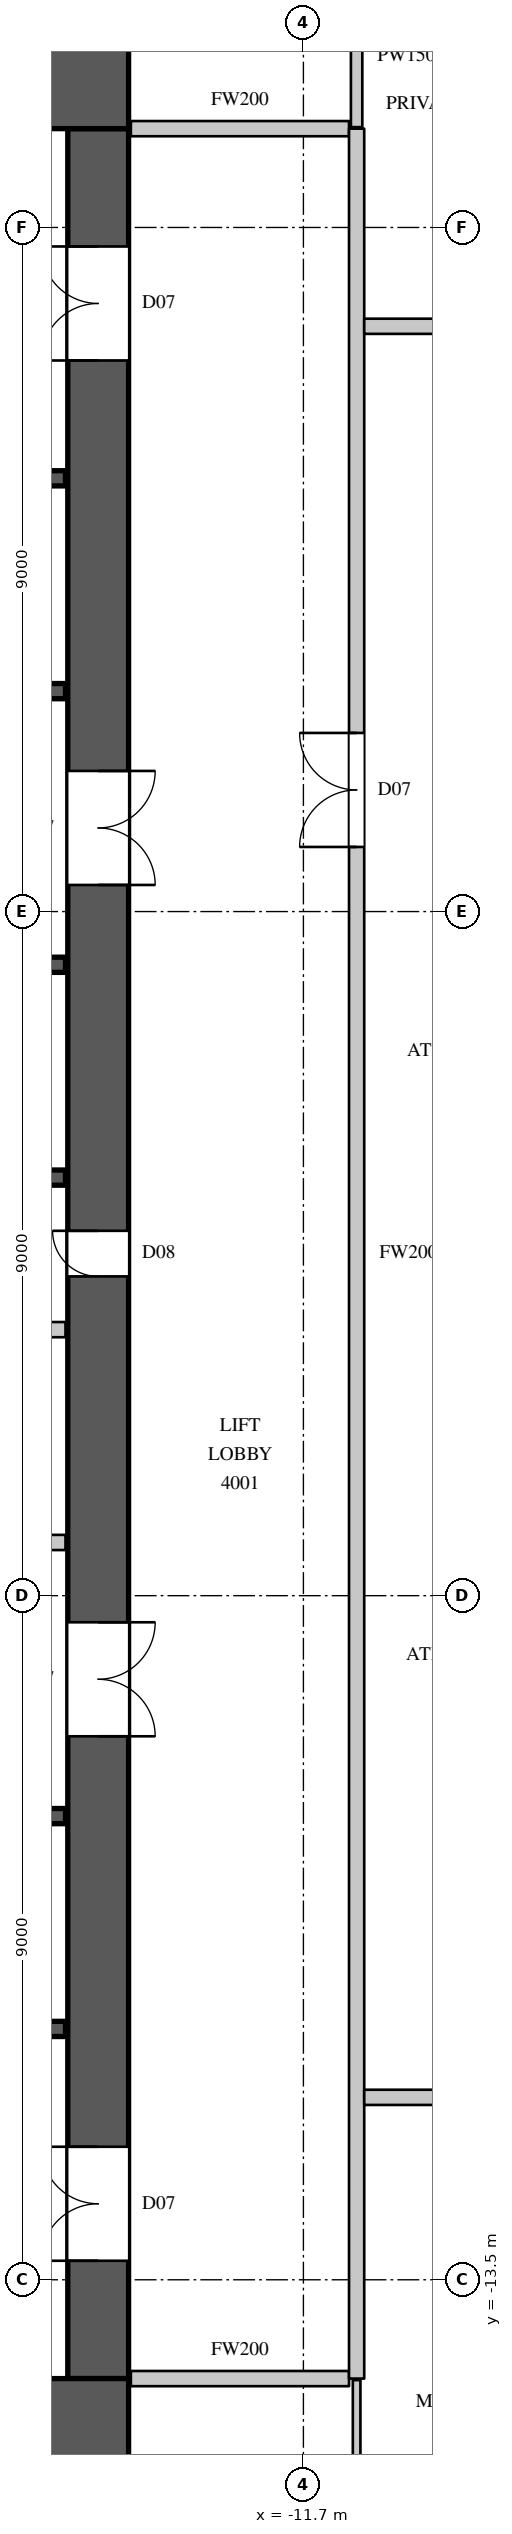
"""IFC4 building model, lengths in metres.
Left out: names, types, materials, properties, quantities, classifications, styles, units other than length and angle.
Written with IfcOpenShell. Run it as: python <this file> out.ifc"""

import sys

from ifc_helpers import new_model, si_unit, direction, frame, frame_2d, origin, place, context, subcontext, project, spatial, rectangle, extrude, element, fill, save


model = new_model("IFC4")
c1 = context("Model", 3, precision=1e-05, world=origin(), true_north=direction((0.0, 1.0)))
c2 = subcontext(c1, "Body", "Model", "MODEL_VIEW")
j1 = project(units=[si_unit("LENGTHUNIT", "METRE"), si_unit("PLANEANGLEUNIT", "RADIAN")], contexts=[c1])
p1 = place(None, origin())
s1 = spatial("IfcSite", under=j1, at=p1, CompositionType="ELEMENT")
p2 = place(p1, origin())
s2 = spatial("IfcBuilding", under=s1, at=p2, CompositionType="ELEMENT")
p3 = place(p2, frame((0.0, 0.0, 185.1)))
s3 = spatial("IfcBuildingStorey", under=s2, at=p3, CompositionType="ELEMENT", Elevation=185.1)
for number, where, z_axis, x_axis in (
    (1, (-30.0, 15.4, 0.0), (0.0, 0.0, 1.0), (1.0, 0.0, 0.0)),
    (2, (-30.0, -15.4, 0.0), (0.0, 0.0, 1.0), (1.0, 0.0, 0.0)),
):
    element("IfcWall", number, at=place(p3, frame(where, z_axis=z_axis, x_axis=x_axis)), inside=s3, PredefinedType="SHEAR", context=c2, shape_type="SweptSolid", body=[
        extrude(rectangle(XDim=16.0, YDim=1.2, at=frame_2d((8.0, 0.0))), origin(), (0.0, 0.0, 1.0), 4.1),
    ])
p4 = place(p3, frame((-14.4, -14.8, 0.0), z_axis=(0.0, 0.0, 1.0), x_axis=(0.0, 1.0, 0.0)))
e3 = element("IfcWall", 3, at=p4, inside=s3, PredefinedType="SHEAR", context=c2, shape_type="SweptSolid", body=[
    extrude(rectangle(XDim=29.6, YDim=0.8, at=frame_2d((14.8, 0.0))), origin(), (0.0, 0.0, 1.0), 4.1),
])
p5 = place(p4, frame((1.55, 0.0, 0.0)))
e4 = element("IfcOpeningElement", 4, at=p5, cuts=e3, PredefinedType="OPENING", context=c2, shape_type="SweptSolid", body=[
    extrude(rectangle(XDim=1.5, YDim=2.4, at=frame_2d((0.75, 1.2))), frame((0.0, 0.41, 0.0), z_axis=(0.0, -1.0, 0.0), x_axis=(1.0, 0.0, 0.0)), (0.0, 0.0, 1.0), 0.82),
])
p6 = place(p4, frame((26.55, 0.0, 0.0)))
e5 = element("IfcOpeningElement", 5, at=p6, cuts=e3, PredefinedType="OPENING", context=c2, shape_type="SweptSolid", body=[
    extrude(rectangle(XDim=1.5, YDim=2.4, at=frame_2d((0.75, 1.2))), frame((0.0, 0.41, 0.0), z_axis=(0.0, -1.0, 0.0), x_axis=(1.0, 0.0, 0.0)), (0.0, 0.0, 1.0), 0.82),
])
p7 = place(p4, frame((8.45, 0.0, 0.0)))
e6 = element("IfcOpeningElement", 6, at=p7, cuts=e3, PredefinedType="OPENING", context=c2, shape_type="SweptSolid", body=[
    extrude(rectangle(XDim=1.5, YDim=2.4, at=frame_2d((0.75, 1.2))), frame((0.0, 0.41, 0.0), z_axis=(0.0, -1.0, 0.0), x_axis=(1.0, 0.0, 0.0)), (0.0, 0.0, 1.0), 0.82),
])
p8 = place(p4, frame((19.65, 0.0, 0.0)))
e7 = element("IfcOpeningElement", 7, at=p8, cuts=e3, PredefinedType="OPENING", context=c2, shape_type="SweptSolid", body=[
    extrude(rectangle(XDim=1.5, YDim=2.4, at=frame_2d((0.75, 1.2))), frame((0.0, 0.41, 0.0), z_axis=(0.0, -1.0, 0.0), x_axis=(1.0, 0.0, 0.0)), (0.0, 0.0, 1.0), 0.82),
])
p9 = place(p4, frame((14.5, 0.0, 0.0)))
e8 = element("IfcOpeningElement", 8, at=p9, cuts=e3, PredefinedType="OPENING", context=c2, shape_type="SweptSolid", body=[
    extrude(rectangle(XDim=0.6, YDim=2.0, at=frame_2d((0.3, 1.0))), frame((0.0, 0.41, 0.0), z_axis=(0.0, -1.0, 0.0), x_axis=(1.0, 0.0, 0.0)), (0.0, 0.0, 1.0), 0.82),
])
p10 = place(p3, frame((-23.02, -3.8, 0.0), z_axis=(0.0, 0.0, 1.0), x_axis=(1.0, 0.0, 0.0)))
e9 = element("IfcWall", 9, at=p10, inside=s3, PredefinedType="PARTITIONING", context=c2, shape_type="SweptSolid", body=[
    extrude(rectangle(XDim=8.19, YDim=0.2, at=frame_2d((4.095, 0.0))), origin(), (0.0, 0.0, 1.0), 3.8),
])
p11 = place(p10, frame((1.5, 0.0, 0.0)))
e10 = element("IfcOpeningElement", 10, at=p11, cuts=e9, PredefinedType="OPENING", context=c2, shape_type="SweptSolid", body=[
    extrude(rectangle(XDim=0.9, YDim=2.2, at=frame_2d((0.45, 1.1))), frame((0.0, 0.11, 0.0), z_axis=(0.0, -1.0, 0.0), x_axis=(1.0, 0.0, 0.0)), (0.0, 0.0, 1.0), 0.22),
])
p12 = place(p10, frame((5.45, 0.0, 0.0)))
e11 = element("IfcOpeningElement", 11, at=p12, cuts=e9, PredefinedType="OPENING", context=c2, shape_type="SweptSolid", body=[
    extrude(rectangle(XDim=0.9, YDim=2.2, at=frame_2d((0.45, 1.1))), frame((0.0, 0.11, 0.0), z_axis=(0.0, -1.0, 0.0), x_axis=(1.0, 0.0, 0.0)), (0.0, 0.0, 1.0), 0.22),
])
for number, where, z_axis, x_axis in (
    (12, (-13.97, -14.8, 0.0), (0.0, 0.0, 1.0), (1.0, 0.0, 0.0)),
    (13, (-13.97, 14.8, 0.0), (0.0, 0.0, 1.0), (1.0, 0.0, 0.0)),
):
    element("IfcWall", number, at=place(p3, frame(where, z_axis=z_axis, x_axis=x_axis)), inside=s3, PredefinedType="PARTITIONING", context=c2, shape_type="SweptSolid", body=[
        extrude(rectangle(XDim=2.87, YDim=0.2, at=frame_2d((1.435, 0.0))), origin(), (0.0, 0.0, 1.0), 3.8),
    ])
p13 = place(p3, frame((-11.0, -14.8, 0.0), z_axis=(0.0, 0.0, 1.0), x_axis=(0.0, 1.0, 0.0)))
e14 = element("IfcWall", 14, at=p13, inside=s3, PredefinedType="PARTITIONING", context=c2, shape_type="SweptSolid", body=[
    extrude(rectangle(XDim=29.6, YDim=0.2, at=frame_2d((14.8, 0.0))), origin(), (0.0, 0.0, 1.0), 3.8),
])
p14 = place(p13, frame((20.15, 0.0, 0.0)))
e15 = element("IfcOpeningElement", 15, at=p14, cuts=e14, PredefinedType="OPENING", context=c2, shape_type="SweptSolid", body=[
    extrude(rectangle(XDim=1.5, YDim=2.4, at=frame_2d((0.75, 1.2))), frame((0.0, 0.11, 0.0), z_axis=(0.0, -1.0, 0.0), x_axis=(1.0, 0.0, 0.0)), (0.0, 0.0, 1.0), 0.22),
])
p15 = place(p3, frame((-10.9, -11.1, 0.0), z_axis=(0.0, 0.0, 1.0), x_axis=(1.0, 0.0, 0.0)))
e16 = element("IfcWall", 16, at=p15, inside=s3, PredefinedType="PARTITIONING", context=c2, shape_type="SweptSolid", body=[
    extrude(rectangle(XDim=20.9, YDim=0.2, at=frame_2d((10.45, 0.0))), origin(), (0.0, 0.0, 1.0), 3.8),
])
p16 = place(p15, frame((1.1, 0.0, 0.0)))
e17 = element("IfcOpeningElement", 17, at=p16, cuts=e16, PredefinedType="OPENING", context=c2, shape_type="SweptSolid", body=[
    extrude(rectangle(XDim=0.9, YDim=2.2, at=frame_2d((0.45, 1.1))), frame((0.0, 0.11, 0.0), z_axis=(0.0, -1.0, 0.0), x_axis=(1.0, 0.0, 0.0)), (0.0, 0.0, 1.0), 0.22),
])
p17 = place(p15, frame((4.9, 0.0, 0.0)))
e18 = element("IfcOpeningElement", 18, at=p17, cuts=e16, PredefinedType="OPENING", context=c2, shape_type="SweptSolid", body=[
    extrude(rectangle(XDim=0.9, YDim=2.2, at=frame_2d((0.45, 1.1))), frame((0.0, 0.11, 0.0), z_axis=(0.0, -1.0, 0.0), x_axis=(1.0, 0.0, 0.0)), (0.0, 0.0, 1.0), 0.22),
])
p18 = place(p15, frame((7.25, 0.0, 0.0)))
e19 = element("IfcOpeningElement", 19, at=p18, cuts=e16, PredefinedType="OPENING", context=c2, shape_type="SweptSolid", body=[
    extrude(rectangle(XDim=0.9, YDim=2.2, at=frame_2d((0.45, 1.1))), frame((0.0, 0.11, 0.0), z_axis=(0.0, -1.0, 0.0), x_axis=(1.0, 0.0, 0.0)), (0.0, 0.0, 1.0), 0.22),
])
p19 = place(p15, frame((9.95, 0.0, 0.0)))
e20 = element("IfcOpeningElement", 20, at=p19, cuts=e16, PredefinedType="OPENING", context=c2, shape_type="SweptSolid", body=[
    extrude(rectangle(XDim=1.1, YDim=2.4, at=frame_2d((0.55, 1.2))), frame((0.0, 0.11, 0.0), z_axis=(0.0, -1.0, 0.0), x_axis=(1.0, 0.0, 0.0)), (0.0, 0.0, 1.0), 0.22),
])
p20 = place(p15, frame((16.3, 0.0, 0.0)))
e21 = element("IfcOpeningElement", 21, at=p20, cuts=e16, PredefinedType="OPENING", context=c2, shape_type="SweptSolid", body=[
    extrude(rectangle(XDim=1.1, YDim=2.4, at=frame_2d((0.55, 1.2))), frame((0.0, 0.11, 0.0), z_axis=(0.0, -1.0, 0.0), x_axis=(1.0, 0.0, 0.0)), (0.0, 0.0, 1.0), 0.22),
])
p21 = place(p3, frame((-10.9, 12.2, 0.0), z_axis=(0.0, 0.0, 1.0), x_axis=(1.0, 0.0, 0.0)))
e22 = element("IfcWall", 22, at=p21, inside=s3, PredefinedType="PARTITIONING", context=c2, shape_type="SweptSolid", body=[
    extrude(rectangle(XDim=3.704, YDim=0.2, at=frame_2d((1.852, 0.0))), origin(), (0.0, 0.0, 1.0), 3.8),
])
p22 = place(p21, frame((1.7, 0.0, 0.0)))
e23 = element("IfcOpeningElement", 23, at=p22, cuts=e22, PredefinedType="OPENING", context=c2, shape_type="SweptSolid", body=[
    extrude(rectangle(XDim=1.1, YDim=2.4, at=frame_2d((0.55, 1.2))), frame((0.0, 0.11, 0.0), z_axis=(0.0, -1.0, 0.0), x_axis=(1.0, 0.0, 0.0)), (0.0, 0.0, 1.0), 0.22),
])
p23 = place(p3, frame((-11.0, 14.82, 0.0), z_axis=(0.0, 0.0, 1.0), x_axis=(0.0, 1.0, 0.0)))
e24 = element("IfcWall", 24, at=p23, inside=s3, PredefinedType="PARTITIONING", context=c2, shape_type="SweptSolid", body=[
    extrude(rectangle(XDim=1.88, YDim=0.15, at=frame_2d((0.94, 0.0))), origin(), (0.0, 0.0, 1.0), 3.8),
])
p24 = place(p3, frame((-29.17, -1.0, 0.0), z_axis=(0.0, 0.0, 1.0), x_axis=(1.0, 0.0, 0.0)))
e25 = element("IfcWall", 25, at=p24, inside=s3, PredefinedType="PARTITIONING", context=c2, shape_type="SweptSolid", body=[
    extrude(rectangle(XDim=14.34, YDim=0.2, at=frame_2d((7.17, 0.0))), origin(), (0.0, 0.0, 1.0), 3.8),
])
p25 = place(p3, frame((-26.08, 1.0, 0.0), z_axis=(0.0, 0.0, 1.0), x_axis=(1.0, 0.0, 0.0)))
e26 = element("IfcWall", 26, at=p25, inside=s3, PredefinedType="SHEAR", context=c2, shape_type="SweptSolid", body=[
    extrude(rectangle(XDim=11.25, YDim=0.2, at=frame_2d((5.625, 0.0))), origin(), (0.0, 0.0, 1.0), 3.8),
])
p26 = place(p3, frame((-26.08, 3.8, 0.0), z_axis=(0.0, 0.0, 1.0), x_axis=(1.0, 0.0, 0.0)))
e27 = element("IfcWall", 27, at=p26, inside=s3, PredefinedType="SHEAR", context=c2, shape_type="SweptSolid", body=[
    extrude(rectangle(XDim=11.25, YDim=0.2, at=frame_2d((5.625, 0.0))), origin(), (0.0, 0.0, 1.0), 3.8),
])
p27 = place(p26, frame((0.8, 0.0, 0.0)))
e28 = element("IfcOpeningElement", 28, at=p27, cuts=e27, PredefinedType="OPENING", context=c2, shape_type="SweptSolid", body=[
    extrude(rectangle(XDim=1.1, YDim=2.2, at=frame_2d((0.55, 1.1))), frame((0.0, 0.11, 0.0), z_axis=(0.0, -1.0, 0.0), x_axis=(1.0, 0.0, 0.0)), (0.0, 0.0, 1.0), 0.22),
])
p28 = place(p26, frame((3.55, 0.0, 0.0)))
e29 = element("IfcOpeningElement", 29, at=p28, cuts=e27, PredefinedType="OPENING", context=c2, shape_type="SweptSolid", body=[
    extrude(rectangle(XDim=1.1, YDim=2.2, at=frame_2d((0.55, 1.1))), frame((0.0, 0.11, 0.0), z_axis=(0.0, -1.0, 0.0), x_axis=(1.0, 0.0, 0.0)), (0.0, 0.0, 1.0), 0.22),
])
p29 = place(p26, frame((6.25, 0.0, 0.0)))
e30 = element("IfcOpeningElement", 30, at=p29, cuts=e27, PredefinedType="OPENING", context=c2, shape_type="SweptSolid", body=[
    extrude(rectangle(XDim=1.1, YDim=2.2, at=frame_2d((0.55, 1.1))), frame((0.0, 0.11, 0.0), z_axis=(0.0, -1.0, 0.0), x_axis=(1.0, 0.0, 0.0)), (0.0, 0.0, 1.0), 0.22),
])
p30 = place(p26, frame((9.15, 0.0, 0.0)))
e31 = element("IfcOpeningElement", 31, at=p30, cuts=e27, PredefinedType="OPENING", context=c2, shape_type="SweptSolid", body=[
    extrude(rectangle(XDim=1.1, YDim=2.2, at=frame_2d((0.55, 1.1))), frame((0.0, 0.11, 0.0), z_axis=(0.0, -1.0, 0.0), x_axis=(1.0, 0.0, 0.0)), (0.0, 0.0, 1.0), 0.22),
])
p31 = place(p3, frame((-17.92, -10.2, 0.0), z_axis=(0.0, 0.0, 1.0), x_axis=(1.0, 0.0, 0.0)))
e32 = element("IfcWall", 32, at=p31, inside=s3, PredefinedType="SHEAR", context=c2, shape_type="SweptSolid", body=[
    extrude(rectangle(XDim=3.09, YDim=0.2, at=frame_2d((1.545, 0.0))), origin(), (0.0, 0.0, 1.0), 3.8),
])
p32 = place(p31, frame((1.0, 0.0, 0.0)))
e33 = element("IfcOpeningElement", 33, at=p32, cuts=e32, PredefinedType="OPENING", context=c2, shape_type="SweptSolid", body=[
    extrude(rectangle(XDim=1.1, YDim=2.2, at=frame_2d((0.55, 1.1))), frame((0.0, 0.11, 0.0), z_axis=(0.0, -1.0, 0.0), x_axis=(1.0, 0.0, 0.0)), (0.0, 0.0, 1.0), 0.22),
])
p33 = place(p3, frame((-17.9, -7.4, 0.0), z_axis=(0.0, 0.0, 1.0), x_axis=(1.0, 0.0, 0.0)))
e34 = element("IfcWall", 34, at=p33, inside=s3, PredefinedType="SHEAR", context=c2, shape_type="SweptSolid", body=[
    extrude(rectangle(XDim=3.07, YDim=0.2, at=frame_2d((1.535, 0.0))), origin(), (0.0, 0.0, 1.0), 3.8),
])
p34 = place(p3, frame((-17.92, 7.4, 0.0), z_axis=(0.0, 0.0, 1.0), x_axis=(1.0, 0.0, 0.0)))
e35 = element("IfcWall", 35, at=p34, inside=s3, PredefinedType="SHEAR", context=c2, shape_type="SweptSolid", body=[
    extrude(rectangle(XDim=3.09, YDim=0.2, at=frame_2d((1.545, 0.0))), origin(), (0.0, 0.0, 1.0), 3.8),
])
p35 = place(p3, frame((-17.92, 10.2, 0.0), z_axis=(0.0, 0.0, 1.0), x_axis=(1.0, 0.0, 0.0)))
e36 = element("IfcWall", 36, at=p35, inside=s3, PredefinedType="SHEAR", context=c2, shape_type="SweptSolid", body=[
    extrude(rectangle(XDim=3.09, YDim=0.2, at=frame_2d((1.545, 0.0))), origin(), (0.0, 0.0, 1.0), 3.8),
])
p36 = place(p35, frame((1.0, 0.0, 0.0)))
e37 = element("IfcOpeningElement", 37, at=p36, cuts=e36, PredefinedType="OPENING", context=c2, shape_type="SweptSolid", body=[
    extrude(rectangle(XDim=1.1, YDim=2.2, at=frame_2d((0.55, 1.1))), frame((0.0, 0.11, 0.0), z_axis=(0.0, -1.0, 0.0), x_axis=(1.0, 0.0, 0.0)), (0.0, 0.0, 1.0), 0.22),
])
p37 = place(p3, frame((-11.0, -16.7, 0.0), z_axis=(0.0, 0.0, 1.0), x_axis=(0.0, 1.0, 0.0)))
e38 = element("IfcWall", 38, at=p37, inside=s3, PredefinedType="PARTITIONING", context=c2, shape_type="SweptSolid", body=[
    extrude(rectangle(XDim=1.88, YDim=0.1, at=frame_2d((0.94, 0.0))), origin(), (0.0, 0.0, 1.0), 3.8),
])
p38 = place(p14, origin())
e39 = element("IfcDoor", 39, at=p38, inside=s3, OperationType="DOUBLE_DOOR_SINGLE_SWING", PredefinedType="DOOR", context=c2, shape_type="SweptSolid", body=[
    extrude(rectangle(XDim=1.5, YDim=2.4, at=frame_2d((0.75, 1.2))), frame((0.0, 0.025, 0.0), z_axis=(0.0, -1.0, 0.0), x_axis=(1.0, 0.0, 0.0)), (0.0, 0.0, 1.0), 0.05),
])
fill(e15, e39)
p39 = place(p5, origin())
e40 = element("IfcDoor", 40, at=p39, inside=s3, OperationType="DOUBLE_DOOR_SINGLE_SWING", PredefinedType="DOOR", context=c2, shape_type="SweptSolid", body=[
    extrude(rectangle(XDim=1.5, YDim=2.4, at=frame_2d((0.75, 1.2))), frame((0.0, 0.395, 0.0), z_axis=(0.0, -1.0, 0.0), x_axis=(1.0, 0.0, 0.0)), (0.0, 0.0, 1.0), 0.05),
])
fill(e4, e40)
p40 = place(p6, origin())
e41 = element("IfcDoor", 41, at=p40, inside=s3, OperationType="DOUBLE_DOOR_SINGLE_SWING", PredefinedType="DOOR", context=c2, shape_type="SweptSolid", body=[
    extrude(rectangle(XDim=1.5, YDim=2.4, at=frame_2d((0.75, 1.2))), frame((0.0, 0.395, 0.0), z_axis=(0.0, -1.0, 0.0), x_axis=(1.0, 0.0, 0.0)), (0.0, 0.0, 1.0), 0.05),
])
fill(e5, e41)
p41 = place(p7, origin())
e42 = element("IfcDoor", 42, at=p41, inside=s3, OperationType="DOUBLE_DOOR_SINGLE_SWING", PredefinedType="DOOR", context=c2, shape_type="SweptSolid", body=[
    extrude(rectangle(XDim=1.5, YDim=2.4, at=frame_2d((0.75, 1.2))), frame((0.0, -0.345, 0.0), z_axis=(0.0, -1.0, 0.0), x_axis=(1.0, 0.0, 0.0)), (0.0, 0.0, 1.0), 0.05),
])
fill(e6, e42)
p42 = place(p8, origin())
e43 = element("IfcDoor", 43, at=p42, inside=s3, OperationType="DOUBLE_DOOR_SINGLE_SWING", PredefinedType="DOOR", context=c2, shape_type="SweptSolid", body=[
    extrude(rectangle(XDim=1.5, YDim=2.4, at=frame_2d((0.75, 1.2))), frame((0.0, -0.345, 0.0), z_axis=(0.0, -1.0, 0.0), x_axis=(1.0, 0.0, 0.0)), (0.0, 0.0, 1.0), 0.05),
])
fill(e7, e43)
p43 = place(p9, origin())
e44 = element("IfcDoor", 44, at=p43, inside=s3, OperationType="SINGLE_SWING_RIGHT", PredefinedType="DOOR", context=c2, shape_type="SweptSolid", body=[
    extrude(rectangle(XDim=0.6, YDim=2.0, at=frame_2d((0.3, 1.0))), frame((0.0, 0.395, 0.0), z_axis=(0.0, -1.0, 0.0), x_axis=(1.0, 0.0, 0.0)), (0.0, 0.0, 1.0), 0.05),
])
fill(e8, e44)
save(model, sys.argv[1])
